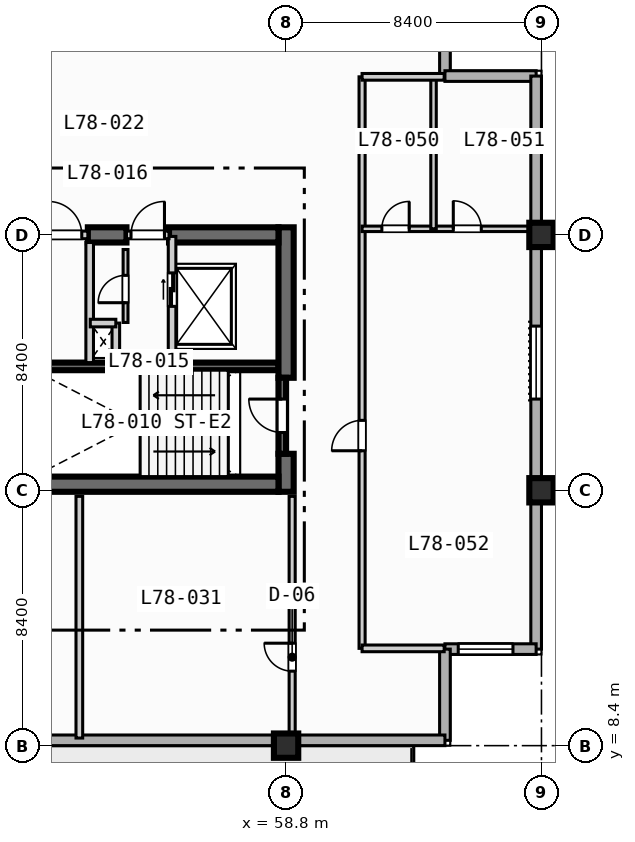
"""IFC4 building model, lengths in metres.
Left out: names, types, materials, properties, quantities, classifications, styles, units other than length and angle.
Written with IfcOpenShell. Run it as: python <this file> out.ifc"""

import sys

from ifc_helpers import new_model, si_unit, direction, frame, frame_2d, origin, origin_2d, place, context, subcontext, project, spatial, rectangle, extrude, element, fill, save


model = new_model("IFC4")
c1 = context("Model", 3, precision=1e-05, world=origin(), true_north=direction((0.0, 1.0)))
c2 = subcontext(c1, "Body", "Model", "MODEL_VIEW")
j1 = project(units=[si_unit("LENGTHUNIT", "METRE"), si_unit("PLANEANGLEUNIT", "RADIAN")], contexts=[c1])
p1 = place(None, origin())
s1 = spatial("IfcSite", under=j1, at=p1, CompositionType="ELEMENT")
p2 = place(p1, origin())
s2 = spatial("IfcBuilding", under=s1, at=p2, CompositionType="ELEMENT")
p3 = place(p2, frame((0.0, 0.0, 316.4)))
s3 = spatial("IfcBuildingStorey", under=s2, at=p3, CompositionType="ELEMENT", Elevation=316.4)
p4 = place(p3, frame((50.5, 20.875, 0.0), z_axis=(0.0, 0.0, 1.0), x_axis=(1.0, 0.0, 0.0)))
e1 = element("IfcWall", 1, at=p4, inside=s3, PredefinedType="SOLIDWALL", context=c2, shape_type="SweptSolid", body=[
    extrude(rectangle(XDim=8.05, YDim=0.25, at=frame_2d((4.025, 0.0))), origin(), (0.0, 0.0, 1.0), 3.67),
])
p5 = place(p3, frame((58.8, 16.75, 0.0), z_axis=(0.0, 0.0, 1.0), x_axis=(0.0, 1.0, 0.0)))
e2 = element("IfcWall", 2, at=p5, inside=s3, PredefinedType="SHEAR", context=c2, shape_type="SweptSolid", body=[
    extrude(rectangle(XDim=1.25, YDim=0.5, at=frame_2d((0.625, 0.0))), origin(), (0.0, 0.0, 1.0), 3.67),
])
p6 = place(p3, frame((58.8, 20.5, 0.0), z_axis=(0.0, 0.0, 1.0), x_axis=(0.0, 1.0, 0.0)))
e3 = element("IfcWall", 3, at=p6, inside=s3, PredefinedType="SHEAR", context=c2, shape_type="SweptSolid", body=[
    extrude(rectangle(XDim=4.95, YDim=0.5, at=frame_2d((2.475, 0.0))), origin(), (0.0, 0.0, 1.0), 3.67),
])
p7 = place(p3, frame((42.2, 17.0, 0.0), z_axis=(0.0, 0.0, 1.0), x_axis=(1.0, 0.0, 0.0)))
e4 = element("IfcWall", 4, at=p7, inside=s3, PredefinedType="SHEAR", context=c2, shape_type="SweptSolid", body=[
    extrude(rectangle(XDim=16.35, YDim=0.5, at=frame_2d((8.175, 0.0))), origin(), (0.0, 0.0, 1.0), 3.67),
])
p8 = place(p3, frame((52.28, 25.2, 0.0), z_axis=(0.0, 0.0, 1.0), x_axis=(1.0, 0.0, 0.0)))
e5 = element("IfcWall", 5, at=p8, inside=s3, PredefinedType="SHEAR", context=c2, shape_type="SweptSolid", body=[
    extrude(rectangle(XDim=1.27, YDim=0.5, at=frame_2d((0.635, 0.0))), origin(), (0.0, 0.0, 1.0), 3.67),
])
p9 = place(p3, frame((54.95, 25.2, 0.0), z_axis=(0.0, 0.0, 1.0), x_axis=(1.0, 0.0, 0.0)))
e6 = element("IfcWall", 6, at=p9, inside=s3, PredefinedType="SHEAR", context=c2, shape_type="SweptSolid", body=[
    extrude(rectangle(XDim=3.6, YDim=0.5, at=frame_2d((1.8, 0.0))), origin(), (0.0, 0.0, 1.0), 3.67),
])
for number, where, z_axis, x_axis in (
    (7, (58.8, 8.4, 0.0), (0.0, 0.0, 1.0), (1.0, 0.0, 0.0)),
    (8, (67.2, 16.8, 0.0), (0.0, 0.0, 1.0), (1.0, 0.0, 0.0)),
    (9, (67.2, 25.2, 0.0), (0.0, 0.0, 1.0), (1.0, 0.0, 0.0)),
):
    element("IfcColumn", number, at=place(p3, frame(where, z_axis=z_axis, x_axis=x_axis)), inside=s3, PredefinedType="COLUMN", context=c2, shape_type="SweptSolid", body=[
        extrude(rectangle(XDim=0.8, YDim=0.8, at=origin_2d()), origin(), (0.0, 0.0, 1.0), 3.9),
    ])
for number, where, z_axis, x_axis in (
    (10, (64.025, 33.425, 0.0), (0.0, 0.0, 1.0), (0.0, -1.0, 0.0)),
    (11, (64.025, 30.425, 0.0), (0.0, 0.0, 1.0), (1.0, 0.0, 0.0)),
):
    element("IfcWall", number, at=place(p3, frame(where, z_axis=z_axis, x_axis=x_axis)), inside=s3, PredefinedType="STANDARD", context=c2, shape_type="SweptSolid", body=[
        extrude(rectangle(XDim=3.0, YDim=0.35, at=frame_2d((1.5, 0.0))), origin(), (0.0, 0.0, 1.0), 3.67),
    ])
p10 = place(p3, frame((67.025, 30.425, 0.0), z_axis=(0.0, 0.0, 1.0), x_axis=(0.0, -1.0, 0.0)))
e12 = element("IfcWall", 12, at=p10, inside=s3, PredefinedType="STANDARD", context=c2, shape_type="SweptSolid", body=[
    extrude(rectangle(XDim=18.85, YDim=0.35, at=frame_2d((9.425, 0.0))), origin(), (0.0, 0.0, 1.0), 3.67),
])
p11 = place(p10, frame((8.225, 0.0, 0.85)))
e13 = element("IfcOpeningElement", 13, at=p11, cuts=e12, PredefinedType="OPENING", context=c2, shape_type="SweptSolid", body=[
    extrude(rectangle(XDim=2.4, YDim=1.95, at=frame_2d((1.2, 0.975))), frame((0.0, 0.185, 0.0), z_axis=(0.0, -1.0, 0.0), x_axis=(1.0, 0.0, 0.0)), (0.0, 0.0, 1.0), 0.37),
])
p12 = place(p3, frame((67.025, 11.575, 0.0), z_axis=(0.0, 0.0, 1.0), x_axis=(-1.0, 0.0, 0.0)))
e14 = element("IfcWall", 14, at=p12, inside=s3, PredefinedType="STANDARD", context=c2, shape_type="SweptSolid", body=[
    extrude(rectangle(XDim=3.0, YDim=0.35, at=frame_2d((1.5, 0.0))), origin(), (0.0, 0.0, 1.0), 3.67),
])
p13 = place(p12, frame((0.762, 0.0, 0.85)))
e15 = element("IfcOpeningElement", 15, at=p13, cuts=e14, PredefinedType="OPENING", context=c2, shape_type="SweptSolid", body=[
    extrude(rectangle(XDim=1.8, YDim=1.8, at=frame_2d((0.9, 0.9))), frame((0.0, 0.185, 0.0), z_axis=(0.0, -1.0, 0.0), x_axis=(1.0, 0.0, 0.0)), (0.0, 0.0, 1.0), 0.37),
])
p14 = place(p3, frame((64.025, 11.575, 0.0), z_axis=(0.0, 0.0, 1.0), x_axis=(0.0, -1.0, 0.0)))
e16 = element("IfcWall", 16, at=p14, inside=s3, PredefinedType="STANDARD", context=c2, shape_type="SweptSolid", body=[
    extrude(rectangle(XDim=3.0, YDim=0.35, at=frame_2d((1.5, 0.0))), origin(), (0.0, 0.0, 1.0), 3.67),
])
p15 = place(p3, frame((64.025, 8.575, 0.0), z_axis=(0.0, 0.0, 1.0), x_axis=(-1.0, 0.0, 0.0)))
e17 = element("IfcWall", 17, at=p15, inside=s3, PredefinedType="STANDARD", context=c2, shape_type="SweptSolid", body=[
    extrude(rectangle(XDim=52.45, YDim=0.35, at=frame_2d((26.225, 0.0))), origin(), (0.0, 0.0, 1.0), 3.67),
])
p16 = place(p15, frame((33.925, 0.0, 0.0)))
e18 = element("IfcOpeningElement", 18, at=p16, cuts=e17, PredefinedType="OPENING", context=c2, shape_type="SweptSolid", body=[
    extrude(rectangle(XDim=1.4, YDim=2.2, at=frame_2d((0.7, 1.1))), frame((0.0, 0.185, 0.0), z_axis=(0.0, -1.0, 0.0), x_axis=(1.0, 0.0, 0.0)), (0.0, 0.0, 1.0), 0.37),
])
p17 = place(p15, frame((41.825, 0.0, 0.85)))
e19 = element("IfcOpeningElement", 19, at=p17, cuts=e17, PredefinedType="OPENING", context=c2, shape_type="SweptSolid", body=[
    extrude(rectangle(XDim=2.4, YDim=1.95, at=frame_2d((1.2, 0.975))), frame((0.0, 0.185, 0.0), z_axis=(0.0, -1.0, 0.0), x_axis=(1.0, 0.0, 0.0)), (0.0, 0.0, 1.0), 0.37),
])
p18 = place(p15, frame((25.025, 0.0, 0.85)))
e20 = element("IfcOpeningElement", 20, at=p18, cuts=e17, PredefinedType="OPENING", context=c2, shape_type="SweptSolid", body=[
    extrude(rectangle(XDim=2.4, YDim=1.95, at=frame_2d((1.2, 0.975))), frame((0.0, 0.185, 0.0), z_axis=(0.0, -1.0, 0.0), x_axis=(1.0, 0.0, 0.0)), (0.0, 0.0, 1.0), 0.37),
])
p19 = place(p15, frame((16.925, 0.0, 0.85)))
e21 = element("IfcOpeningElement", 21, at=p19, cuts=e17, PredefinedType="OPENING", context=c2, shape_type="SweptSolid", body=[
    extrude(rectangle(XDim=1.8, YDim=1.8, at=frame_2d((0.9, 0.9))), frame((0.0, 0.185, 0.0), z_axis=(0.0, -1.0, 0.0), x_axis=(1.0, 0.0, 0.0)), (0.0, 0.0, 1.0), 0.37),
])
p20 = place(p15, frame((50.275, 0.0, 0.85)))
e22 = element("IfcOpeningElement", 22, at=p20, cuts=e17, PredefinedType="OPENING", context=c2, shape_type="SweptSolid", body=[
    extrude(rectangle(XDim=1.8, YDim=1.8, at=frame_2d((0.9, 0.9))), frame((0.0, 0.185, 0.0), z_axis=(0.0, -1.0, 0.0), x_axis=(1.0, 0.0, 0.0)), (0.0, 0.0, 1.0), 0.37),
])
p21 = place(p3, frame((58.675, 18.0, 0.0), z_axis=(0.0, 0.0, 1.0), x_axis=(0.0, 1.0, 0.0)))
e23 = element("IfcWall", 23, at=p21, inside=s3, PredefinedType="SOLIDWALL", context=c2, shape_type="SweptSolid", body=[
    extrude(rectangle(XDim=2.5, YDim=0.25, at=frame_2d((1.25, 0.0))), origin(), (0.0, 0.0, 1.0), 3.67),
])
p22 = place(p21, frame((0.7, 0.0, 0.0)))
e24 = element("IfcOpeningElement", 24, at=p22, cuts=e23, PredefinedType="OPENING", context=c2, shape_type="SweptSolid", body=[
    extrude(rectangle(XDim=1.1, YDim=2.15, at=frame_2d((0.55, 1.075))), frame((0.0, 0.135, 0.0), z_axis=(0.0, -1.0, 0.0), x_axis=(1.0, 0.0, 0.0)), (0.0, 0.0, 1.0), 0.27),
])
p23 = place(p3, frame((50.8, 25.2, 0.0), z_axis=(0.0, 0.0, 1.0), x_axis=(1.0, 0.0, 0.0)))
e25 = element("IfcWall", 25, at=p23, inside=s3, PredefinedType="SOLIDWALL", context=c2, shape_type="SweptSolid", body=[
    extrude(rectangle(XDim=1.48, YDim=0.25, at=frame_2d((0.74, 0.0))), origin(), (0.0, 0.0, 1.0), 3.67),
])
p24 = place(p23, frame((0.18, 0.0, 0.0)))
e26 = element("IfcOpeningElement", 26, at=p24, cuts=e25, PredefinedType="OPENING", context=c2, shape_type="SweptSolid", body=[
    extrude(rectangle(XDim=1.1, YDim=2.15, at=frame_2d((0.55, 1.075))), frame((0.0, 0.135, 0.0), z_axis=(0.0, -1.0, 0.0), x_axis=(1.0, 0.0, 0.0)), (0.0, 0.0, 1.0), 0.27),
])
p25 = place(p3, frame((52.34, 21.0, 0.0), z_axis=(0.0, 0.0, 1.0), x_axis=(0.0, 1.0, 0.0)))
e27 = element("IfcWall", 27, at=p25, inside=s3, PredefinedType="SOLIDWALL", context=c2, shape_type="SweptSolid", body=[
    extrude(rectangle(XDim=3.95, YDim=0.25, at=frame_2d((1.975, 0.0))), origin(), (0.0, 0.0, 1.0), 3.67),
])
p26 = place(p3, frame((55.05, 21.0, 0.0), z_axis=(0.0, 0.0, 1.0), x_axis=(0.0, 1.0, 0.0)))
e28 = element("IfcWall", 28, at=p26, inside=s3, PredefinedType="SOLIDWALL", context=c2, shape_type="SweptSolid", body=[
    extrude(rectangle(XDim=4.15, YDim=0.25, at=frame_2d((2.075, 0.0))), origin(), (0.0, 0.0, 1.0), 3.67),
])
p27 = place(p26, frame((1.85, 0.0, 0.0)))
e29 = element("IfcOpeningElement", 29, at=p27, cuts=e28, PredefinedType="OPENING", context=c2, shape_type="SweptSolid", body=[
    extrude(rectangle(XDim=1.1, YDim=2.15, at=frame_2d((0.55, 1.075))), frame((0.0, 0.135, 0.0), z_axis=(0.0, -1.0, 0.0), x_axis=(1.0, 0.0, 0.0)), (0.0, 0.0, 1.0), 0.27),
])
p28 = place(p3, frame((53.55, 25.2, 0.0), z_axis=(0.0, 0.0, 1.0), x_axis=(1.0, 0.0, 0.0)))
e30 = element("IfcWall", 30, at=p28, inside=s3, PredefinedType="SOLIDWALL", context=c2, shape_type="SweptSolid", body=[
    extrude(rectangle(XDim=1.4, YDim=0.25, at=frame_2d((0.7, 0.0))), origin(), (0.0, 0.0, 1.0), 3.67),
])
p29 = place(p28, frame((0.15, 0.0, 0.0)))
e31 = element("IfcOpeningElement", 31, at=p29, cuts=e30, PredefinedType="OPENING", context=c2, shape_type="SweptSolid", body=[
    extrude(rectangle(XDim=1.1, YDim=2.15, at=frame_2d((0.55, 1.075))), frame((0.0, 0.135, 0.0), z_axis=(0.0, -1.0, 0.0), x_axis=(1.0, 0.0, 0.0)), (0.0, 0.0, 1.0), 0.27),
])
p30 = place(p3, frame((53.2, 21.0, 0.0), z_axis=(0.0, 0.0, 1.0), x_axis=(0.0, 1.0, 0.0)))
e32 = element("IfcWall", 32, at=p30, inside=s3, PredefinedType="SOLIDWALL", context=c2, shape_type="SweptSolid", body=[
    extrude(rectangle(XDim=1.3, YDim=0.25, at=frame_2d((0.65, 0.0))), origin(), (0.0, 0.0, 1.0), 3.67),
])
p31 = place(p3, frame((52.36, 22.3, 0.0), z_axis=(0.0, 0.0, 1.0), x_axis=(1.0, 0.0, 0.0)))
e33 = element("IfcWall", 33, at=p31, inside=s3, PredefinedType="SOLIDWALL", context=c2, shape_type="SweptSolid", body=[
    extrude(rectangle(XDim=0.84, YDim=0.25, at=frame_2d((0.42, 0.0))), origin(), (0.0, 0.0, 1.0), 3.67),
])
p32 = place(p3, frame((53.52, 22.32, 0.0), z_axis=(0.0, 0.0, 1.0), x_axis=(0.0, 1.0, 0.0)))
e34 = element("IfcWall", 34, at=p32, inside=s3, PredefinedType="PARTITIONING", context=c2, shape_type="SweptSolid", body=[
    extrude(rectangle(XDim=2.4, YDim=0.16, at=frame_2d((1.2, 0.0))), origin(), (0.0, 0.0, 1.0), 3.67),
])
p33 = place(p32, frame((0.65, 0.0, 0.0)))
e35 = element("IfcOpeningElement", 35, at=p33, cuts=e34, PredefinedType="OPENING", context=c2, shape_type="SweptSolid", body=[
    extrude(rectangle(XDim=0.9, YDim=2.1, at=frame_2d((0.45, 1.05))), frame((0.0, 0.09, 0.0), z_axis=(0.0, -1.0, 0.0), x_axis=(1.0, 0.0, 0.0)), (0.0, 0.0, 1.0), 0.18),
])
p34 = place(p3, frame((59.0, 8.65, 0.0), z_axis=(0.0, 0.0, 1.0), x_axis=(0.0, 1.0, 0.0)))
e36 = element("IfcWall", 36, at=p34, inside=s3, PredefinedType="PARTITIONING", context=c2, shape_type="SweptSolid", body=[
    extrude(rectangle(XDim=7.95, YDim=0.2, at=frame_2d((3.975, 0.0))), origin(), (0.0, 0.0, 1.0), 3.207),
])
p35 = place(p34, frame((2.2, 0.0, 0.0)))
e37 = element("IfcOpeningElement", 37, at=p35, cuts=e36, PredefinedType="OPENING", context=c2, shape_type="SweptSolid", body=[
    extrude(rectangle(XDim=0.92, YDim=2.1, at=frame_2d((0.46, 1.05))), frame((0.0, 0.11, 0.0), z_axis=(0.0, -1.0, 0.0), x_axis=(1.0, 0.0, 0.0)), (0.0, 0.0, 1.0), 0.22),
])
p36 = place(p3, frame((52.0, 8.65, 0.0), z_axis=(0.0, 0.0, 1.0), x_axis=(0.0, 1.0, 0.0)))
e38 = element("IfcWall", 38, at=p36, inside=s3, PredefinedType="PARTITIONING", context=c2, shape_type="SweptSolid", body=[
    extrude(rectangle(XDim=7.95, YDim=0.22, at=frame_2d((3.975, 0.0))), origin(), (0.0, 0.0, 1.0), 3.67),
])
p37 = place(p3, frame((61.3, 11.6, 0.0), z_axis=(0.0, 0.0, 1.0), x_axis=(0.0, 1.0, 0.0)))
e39 = element("IfcWall", 39, at=p37, inside=s3, PredefinedType="PARTITIONING", context=c2, shape_type="SweptSolid", body=[
    extrude(rectangle(XDim=18.8, YDim=0.2, at=frame_2d((9.4, 0.0))), origin(), (0.0, 0.0, 1.0), 3.67),
])
p38 = place(p37, frame((6.5, 0.0, 0.0)))
e40 = element("IfcOpeningElement", 40, at=p38, cuts=e39, PredefinedType="OPENING", context=c2, shape_type="SweptSolid", body=[
    extrude(rectangle(XDim=1.0, YDim=2.15, at=frame_2d((0.5, 1.075))), frame((0.0, 0.11, 0.0), z_axis=(0.0, -1.0, 0.0), x_axis=(1.0, 0.0, 0.0)), (0.0, 0.0, 1.0), 0.22),
])
p39 = place(p3, frame((61.3, 25.4, 0.0), z_axis=(0.0, 0.0, 1.0), x_axis=(1.0, 0.0, 0.0)))
e41 = element("IfcWall", 41, at=p39, inside=s3, PredefinedType="PLUMBINGWALL", context=c2, shape_type="SweptSolid", body=[
    extrude(rectangle(XDim=5.5, YDim=0.18, at=frame_2d((2.75, 0.0))), origin(), (0.0, 0.0, 1.0), 3.07),
])
p40 = place(p39, frame((0.65, 0.0, 0.0)))
e42 = element("IfcOpeningElement", 42, at=p40, cuts=e41, PredefinedType="OPENING", context=c2, shape_type="SweptSolid", body=[
    extrude(rectangle(XDim=0.9, YDim=2.1, at=frame_2d((0.45, 1.05))), frame((0.0, 0.1, 0.0), z_axis=(0.0, -1.0, 0.0), x_axis=(1.0, 0.0, 0.0)), (0.0, 0.0, 1.0), 0.2),
])
p41 = place(p39, frame((3.0, 0.0, 0.0)))
e43 = element("IfcOpeningElement", 43, at=p41, cuts=e41, PredefinedType="OPENING", context=c2, shape_type="SweptSolid", body=[
    extrude(rectangle(XDim=0.92, YDim=2.1, at=frame_2d((0.46, 1.05))), frame((0.0, 0.1, 0.0), z_axis=(0.0, -1.0, 0.0), x_axis=(1.0, 0.0, 0.0)), (0.0, 0.0, 1.0), 0.2),
])
p42 = place(p3, frame((63.65, 25.4, 0.0), z_axis=(0.0, 0.0, 1.0), x_axis=(0.0, 1.0, 0.0)))
e44 = element("IfcWall", 44, at=p42, inside=s3, PredefinedType="PLUMBINGWALL", context=c2, shape_type="SweptSolid", body=[
    extrude(rectangle(XDim=5.0, YDim=0.18, at=frame_2d((2.5, 0.0))), origin(), (0.0, 0.0, 1.0), 3.67),
])
for number, where, z_axis, x_axis in (
    (45, (61.3, 11.6, 0.0), (0.0, 0.0, 1.0), (1.0, 0.0, 0.0)),
    (46, (61.3, 30.4, 0.0), (0.0, 0.0, 1.0), (1.0, 0.0, 0.0)),
):
    element("IfcWall", number, at=place(p3, frame(where, z_axis=z_axis, x_axis=x_axis)), inside=s3, PredefinedType="PARTITIONING", context=c2, shape_type="SweptSolid", body=[
        extrude(rectangle(XDim=2.7, YDim=0.22, at=frame_2d((1.35, 0.0))), origin(), (0.0, 0.0, 1.0), 3.67),
    ])
p43 = place(p11, origin())
e47 = element("IfcWindow", 47, at=p43, inside=s3, PartitioningType="SINGLE_PANEL", PredefinedType="WINDOW", context=c2, shape_type="SweptSolid", body=[
    extrude(rectangle(XDim=2.4, YDim=1.95, at=frame_2d((1.2, 0.975))), frame((0.0, 0.03, 0.0), z_axis=(0.0, -1.0, 0.0), x_axis=(1.0, 0.0, 0.0)), (0.0, 0.0, 1.0), 0.06),
])
fill(e13, e47)
p44 = place(p13, origin())
e48 = element("IfcWindow", 48, at=p44, inside=s3, PartitioningType="SINGLE_PANEL", PredefinedType="WINDOW", context=c2, shape_type="SweptSolid", body=[
    extrude(rectangle(XDim=1.8, YDim=1.8, at=frame_2d((0.9, 0.9))), frame((0.0, 0.03, 0.0), z_axis=(0.0, -1.0, 0.0), x_axis=(1.0, 0.0, 0.0)), (0.0, 0.0, 1.0), 0.06),
])
fill(e15, e48)
p45 = place(p22, origin())
e49 = element("IfcDoor", 49, at=p45, inside=s3, OperationType="SINGLE_SWING_RIGHT", PredefinedType="DOOR", context=c2, shape_type="SweptSolid", body=[
    extrude(rectangle(XDim=1.1, YDim=2.15, at=frame_2d((0.55, 1.075))), frame((0.0, 0.025, 0.0), z_axis=(0.0, -1.0, 0.0), x_axis=(1.0, 0.0, 0.0)), (0.0, 0.0, 1.0), 0.05),
])
fill(e24, e49)
p46 = place(p24, origin())
e50 = element("IfcDoor", 50, at=p46, inside=s3, OperationType="SINGLE_SWING_LEFT", PredefinedType="DOOR", context=c2, shape_type="SweptSolid", body=[
    extrude(rectangle(XDim=1.1, YDim=2.15, at=frame_2d((0.55, 1.075))), frame((0.0, 0.025, 0.0), z_axis=(0.0, -1.0, 0.0), x_axis=(1.0, 0.0, 0.0)), (0.0, 0.0, 1.0), 0.05),
])
fill(e26, e50)
p47 = place(p27, origin())
e51 = element("IfcDoor", 51, at=p47, inside=s3, OperationType="SLIDING_TO_LEFT", PredefinedType="DOOR", context=c2, shape_type="SweptSolid", body=[
    extrude(rectangle(XDim=1.1, YDim=2.15, at=frame_2d((0.55, 1.075))), frame((0.0, 0.025, 0.0), z_axis=(0.0, -1.0, 0.0), x_axis=(1.0, 0.0, 0.0)), (0.0, 0.0, 1.0), 0.05),
])
fill(e29, e51)
p48 = place(p29, origin())
e52 = element("IfcDoor", 52, at=p48, inside=s3, OperationType="SINGLE_SWING_RIGHT", PredefinedType="DOOR", context=c2, shape_type="SweptSolid", body=[
    extrude(rectangle(XDim=1.1, YDim=2.15, at=frame_2d((0.55, 1.075))), frame((0.0, 0.025, 0.0), z_axis=(0.0, -1.0, 0.0), x_axis=(1.0, 0.0, 0.0)), (0.0, 0.0, 1.0), 0.05),
])
fill(e31, e52)
p49 = place(p33, origin())
e53 = element("IfcDoor", 53, at=p49, inside=s3, OperationType="SINGLE_SWING_LEFT", PredefinedType="DOOR", context=c2, shape_type="SweptSolid", body=[
    extrude(rectangle(XDim=0.9, YDim=2.1, at=frame_2d((0.45, 1.05))), frame((0.0, 0.025, 0.0), z_axis=(0.0, -1.0, 0.0), x_axis=(1.0, 0.0, 0.0)), (0.0, 0.0, 1.0), 0.05),
])
fill(e35, e53)
p50 = place(p35, origin())
e54 = element("IfcDoor", 54, at=p50, inside=s3, OperationType="SINGLE_SWING_RIGHT", PredefinedType="DOOR", context=c2, shape_type="SweptSolid", body=[
    extrude(rectangle(XDim=0.92, YDim=2.1, at=frame_2d((0.46, 1.05))), frame((0.0, 0.025, 0.0), z_axis=(0.0, -1.0, 0.0), x_axis=(1.0, 0.0, 0.0)), (0.0, 0.0, 1.0), 0.05),
])
fill(e37, e54)
p51 = place(p38, origin())
e55 = element("IfcDoor", 55, at=p51, inside=s3, OperationType="SINGLE_SWING_LEFT", PredefinedType="DOOR", context=c2, shape_type="SweptSolid", body=[
    extrude(rectangle(XDim=1.0, YDim=2.15, at=frame_2d((0.5, 1.075))), frame((0.0, 0.025, 0.0), z_axis=(0.0, -1.0, 0.0), x_axis=(1.0, 0.0, 0.0)), (0.0, 0.0, 1.0), 0.05),
])
fill(e40, e55)
p52 = place(p40, origin())
e56 = element("IfcDoor", 56, at=p52, inside=s3, OperationType="SINGLE_SWING_RIGHT", PredefinedType="DOOR", context=c2, shape_type="SweptSolid", body=[
    extrude(rectangle(XDim=0.9, YDim=2.1, at=frame_2d((0.45, 1.05))), frame((0.0, 0.025, 0.0), z_axis=(0.0, -1.0, 0.0), x_axis=(1.0, 0.0, 0.0)), (0.0, 0.0, 1.0), 0.05),
])
fill(e42, e56)
p53 = place(p41, origin())
e57 = element("IfcDoor", 57, at=p53, inside=s3, OperationType="SINGLE_SWING_LEFT", PredefinedType="DOOR", context=c2, shape_type="SweptSolid", body=[
    extrude(rectangle(XDim=0.92, YDim=2.1, at=frame_2d((0.46, 1.05))), frame((0.0, 0.025, 0.0), z_axis=(0.0, -1.0, 0.0), x_axis=(1.0, 0.0, 0.0)), (0.0, 0.0, 1.0), 0.05),
])
fill(e43, e57)
save(model, sys.argv[1])
